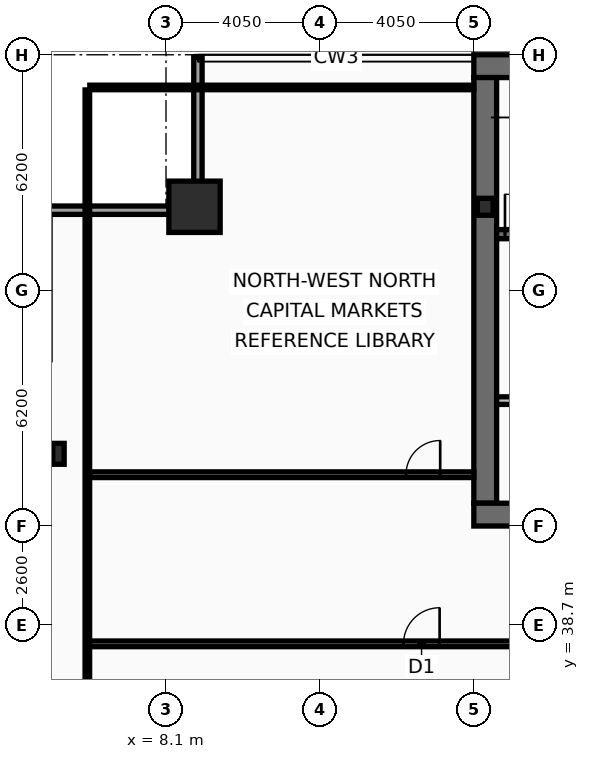
"""IFC4 building model, lengths in metres.
Left out: names, types, materials, properties, quantities, classifications, styles, units other than length and angle.
Written with IfcOpenShell. Run it as: python <this file> out.ifc"""

import sys

from ifc_helpers import new_model, si_unit, direction, frame, frame_2d, origin, origin_2d, place, context, subcontext, project, spatial, rectangle, hollow_rectangle, i_section, extrude, element, fill, save


model = new_model("IFC4")
c1 = context("Model", 3, precision=1e-05, world=origin(), true_north=direction((0.0, 1.0)))
c2 = subcontext(c1, "Body", "Model", "MODEL_VIEW")
j1 = project(units=[si_unit("LENGTHUNIT", "METRE"), si_unit("PLANEANGLEUNIT", "RADIAN")], contexts=[c1])
p1 = place(None, origin())
s1 = spatial("IfcSite", under=j1, at=p1, CompositionType="ELEMENT")
p2 = place(p1, origin())
s2 = spatial("IfcBuilding", under=s1, at=p2, CompositionType="ELEMENT")
p3 = place(p2, frame((0.0, 0.0, 180.6)))
s3 = spatial("IfcBuildingStorey", under=s2, at=p3, CompositionType="ELEMENT", Elevation=180.6)
p4 = place(p3, frame((16.2, 53.4, 0.0), z_axis=(0.0, 0.0, 1.0), x_axis=(1.0, 0.0, 0.0)))
e1 = element("IfcWall", 1, at=p4, inside=s3, PredefinedType="SHEAR", context=c2, shape_type="SweptSolid", body=[
    extrude(rectangle(XDim=40.5, YDim=0.6, at=frame_2d((20.25, 0.0))), origin(), (0.0, 0.0, 1.0), 3.4),
])
p5 = place(p3, frame((16.5, 41.9, 0.0), z_axis=(0.0, 0.0, 1.0), x_axis=(0.0, 1.0, 0.0)))
e2 = element("IfcWall", 2, at=p5, inside=s3, PredefinedType="SHEAR", context=c2, shape_type="SweptSolid", body=[
    extrude(rectangle(XDim=11.2, YDim=0.6, at=frame_2d((5.6, 0.0))), origin(), (0.0, 0.0, 1.0), 3.4),
])
p6 = place(p3, frame((18.65, 41.6, 0.0), z_axis=(0.0, 0.0, 1.0), x_axis=(-1.0, 0.0, 0.0)))
e3 = element("IfcWall", 3, at=p6, inside=s3, PredefinedType="SHEAR", context=c2, shape_type="SweptSolid", body=[
    extrude(rectangle(XDim=2.45, YDim=0.6, at=frame_2d((1.225, 0.0))), origin(), (0.0, 0.0, 1.0), 3.4),
])
p7 = place(p3, frame((16.8, 48.98, 0.0), z_axis=(0.0, 0.0, 1.0), x_axis=(1.0, 0.0, 0.0)))
e4 = element("IfcWall", 4, at=p7, inside=s3, PredefinedType="SHEAR", context=c2, shape_type="SweptSolid", body=[
    extrude(rectangle(XDim=7.42, YDim=0.24, at=frame_2d((3.71, 0.0))), origin(), (0.0, 0.0, 1.0), 3.4),
])
p8 = place(p7, frame((0.22, 0.0, 0.0)))
e5 = element("IfcOpeningElement", 5, at=p8, cuts=e4, PredefinedType="OPENING", context=c2, shape_type="SweptSolid", body=[
    extrude(rectangle(XDim=1.05, YDim=2.15, at=frame_2d((0.525, 1.075))), frame((0.0, 0.13, 0.0), z_axis=(0.0, -1.0, 0.0), x_axis=(1.0, 0.0, 0.0)), (0.0, 0.0, 1.0), 0.26),
])
p9 = place(p3, frame((8.85, 49.7, 0.0), z_axis=(0.0, 0.0, 1.0), x_axis=(1.0, 0.0, 0.0)))
e6 = element("IfcColumn", 6, at=p9, inside=s3, PredefinedType="COLUMN", context=c2, shape_type="SweptSolid", body=[
    extrude(hollow_rectangle(XDim=1.35, YDim=1.35, WallThickness=0.065, at=origin_2d()), origin(), (0.0, 0.0, 1.0), 3.6),
])
p10 = place(p3, frame((5.27, 43.2, 0.0), z_axis=(0.0, 0.0, 1.0), x_axis=(1.0, 0.0, 0.0)))
e7 = element("IfcColumn", 7, at=p10, inside=s3, PredefinedType="COLUMN", context=c2, shape_type="SweptSolid", body=[
    extrude(i_section(OverallWidth=0.3, OverallDepth=0.55, WebThickness=0.015, FlangeThickness=0.029, at=origin_2d()), origin(), (0.0, 0.0, 1.0), 3.6),
])
p11 = place(p3, frame((16.5, 49.7, 0.0), z_axis=(0.0, 0.0, 1.0), x_axis=(1.0, 0.0, 0.0)))
e8 = element("IfcColumn", 8, at=p11, inside=s3, PredefinedType="COLUMN", context=c2, shape_type="SweptSolid", body=[
    extrude(i_section(OverallWidth=0.416, OverallDepth=0.446, WebThickness=0.039, FlangeThickness=0.063, at=origin_2d()), origin(), (0.0, 0.0, 1.0), 3.6),
])
p12 = place(p3, frame((4.83, 49.61, 0.0), z_axis=(0.0, 0.0, 1.0), x_axis=(1.0, 0.0, 0.0)))
e9 = element("IfcWall", 9, at=p12, inside=s3, PredefinedType="SOLIDWALL", context=c2, shape_type="SweptSolid", body=[
    extrude(rectangle(XDim=4.22, YDim=0.22, at=frame_2d((2.11, 0.0))), origin(), (0.0, 0.0, 1.0), 2.79),
])
p13 = place(p3, frame((8.94, 49.72, 0.0), z_axis=(0.0, 0.0, 1.0), x_axis=(0.0, 1.0, 0.0)))
e10 = element("IfcWall", 10, at=p13, inside=s3, PredefinedType="SOLIDWALL", context=c2, shape_type="SweptSolid", body=[
    extrude(rectangle(XDim=3.91, YDim=0.22, at=frame_2d((1.955, 0.0))), origin(), (0.0, 0.0, 1.0), 2.79),
])
p14 = place(p3, frame((16.8, 44.6, 0.0), z_axis=(0.0, 0.0, 1.0), x_axis=(1.0, 0.0, 0.0)))
e11 = element("IfcWall", 11, at=p14, inside=s3, PredefinedType="PARTITIONING", context=c2, shape_type="SweptSolid", body=[
    extrude(rectangle(XDim=4.2, YDim=0.2, at=frame_2d((2.1, 0.0))), origin(), (0.0, 0.0, 1.0), 3.4),
])
p15 = place(p14, frame((1.25, 0.0, 0.0)))
e12 = element("IfcOpeningElement", 12, at=p15, cuts=e11, PredefinedType="OPENING", context=c2, shape_type="SweptSolid", body=[
    extrude(rectangle(XDim=1.05, YDim=2.15, at=frame_2d((0.525, 1.075))), frame((0.0, 0.11, 0.0), z_axis=(0.0, -1.0, 0.0), x_axis=(1.0, 0.0, 0.0)), (0.0, 0.0, 1.0), 0.22),
])
p16 = place(p3, frame((6.03, 38.2, 0.0), z_axis=(0.0, 0.0, 1.0), x_axis=(1.0, 0.0, 0.0)))
e13 = element("IfcWall", 13, at=p16, inside=s3, PredefinedType="PARTITIONING", context=c2, shape_type="SweptSolid", body=[
    extrude(rectangle(XDim=12.52, YDim=0.15, at=frame_2d((6.26, 0.0))), origin(), (0.0, 0.0, 1.0), 2.69),
])
p17 = place(p16, frame((8.32, 0.0, 0.0)))
e14 = element("IfcOpeningElement", 14, at=p17, cuts=e13, PredefinedType="OPENING", context=c2, shape_type="SweptSolid", body=[
    extrude(rectangle(XDim=0.95, YDim=2.05, at=frame_2d((0.475, 1.025))), frame((0.0, 0.085, 0.0), z_axis=(0.0, -1.0, 0.0), x_axis=(1.0, 0.0, 0.0)), (0.0, 0.0, 1.0), 0.17),
])
p18 = place(p3, frame((6.095, 42.65, 0.0), z_axis=(0.0, 0.0, 1.0), x_axis=(1.0, 0.0, 0.0)))
e15 = element("IfcWall", 15, at=p18, inside=s3, PredefinedType="PARTITIONING", context=c2, shape_type="SweptSolid", body=[
    extrude(rectangle(XDim=10.105, YDim=0.15, at=frame_2d((5.052, 0.0))), origin(), (0.0, 0.0, 1.0), 2.69),
])
p19 = place(p18, frame((8.32, 0.0, 0.0)))
e16 = element("IfcOpeningElement", 16, at=p19, cuts=e15, PredefinedType="OPENING", context=c2, shape_type="SweptSolid", body=[
    extrude(rectangle(XDim=0.9, YDim=2.05, at=frame_2d((0.45, 1.025))), frame((0.0, 0.085, 0.0), z_axis=(0.0, -1.0, 0.0), x_axis=(1.0, 0.0, 0.0)), (0.0, 0.0, 1.0), 0.17),
])
p20 = place(p3, frame((6.03, 10.665, 0.0), z_axis=(0.0, 0.0, 1.0), x_axis=(0.0, 1.0, 0.0)))
e17 = element("IfcWall", 17, at=p20, inside=s3, PredefinedType="PARTITIONING", context=c2, shape_type="SweptSolid", body=[
    extrude(rectangle(XDim=42.11, YDim=0.12, at=frame_2d((21.055, 0.0))), origin(), (0.0, 0.0, 1.0), 2.69),
])
p21 = place(p3, frame((6.095, 52.84, 0.0), z_axis=(0.0, 0.0, 1.0), x_axis=(1.0, 0.0, 0.0)))
e18 = element("IfcWall", 18, at=p21, inside=s3, PredefinedType="PARTITIONING", context=c2, shape_type="SweptSolid", body=[
    extrude(rectangle(XDim=10.105, YDim=0.12, at=frame_2d((5.052, 0.0))), origin(), (0.0, 0.0, 1.0), 3.4),
])
p22 = place(p8, origin())
e19 = element("IfcDoor", 19, at=p22, inside=s3, OperationType="SINGLE_SWING_LEFT", PredefinedType="DOOR", context=c2, shape_type="SweptSolid", body=[
    extrude(rectangle(XDim=1.05, YDim=2.15, at=frame_2d((0.525, 1.075))), frame((0.0, 0.025, 0.0), z_axis=(0.0, -1.0, 0.0), x_axis=(1.0, 0.0, 0.0)), (0.0, 0.0, 1.0), 0.05),
])
fill(e5, e19)
p23 = place(p17, origin())
e20 = element("IfcDoor", 20, at=p23, inside=s3, OperationType="SINGLE_SWING_RIGHT", PredefinedType="DOOR", context=c2, shape_type="SweptSolid", body=[
    extrude(rectangle(XDim=0.95, YDim=2.05, at=frame_2d((0.475, 1.025))), frame((0.0, 0.025, 0.0), z_axis=(0.0, -1.0, 0.0), x_axis=(1.0, 0.0, 0.0)), (0.0, 0.0, 1.0), 0.05),
])
fill(e14, e20)
p24 = place(p19, origin())
e21 = element("IfcDoor", 21, at=p24, inside=s3, OperationType="SINGLE_SWING_RIGHT", PredefinedType="DOOR", context=c2, shape_type="SweptSolid", body=[
    extrude(rectangle(XDim=0.9, YDim=2.05, at=frame_2d((0.45, 1.025))), frame((0.0, 0.025, 0.0), z_axis=(0.0, -1.0, 0.0), x_axis=(1.0, 0.0, 0.0)), (0.0, 0.0, 1.0), 0.05),
])
fill(e16, e21)
save(model, sys.argv[1])
